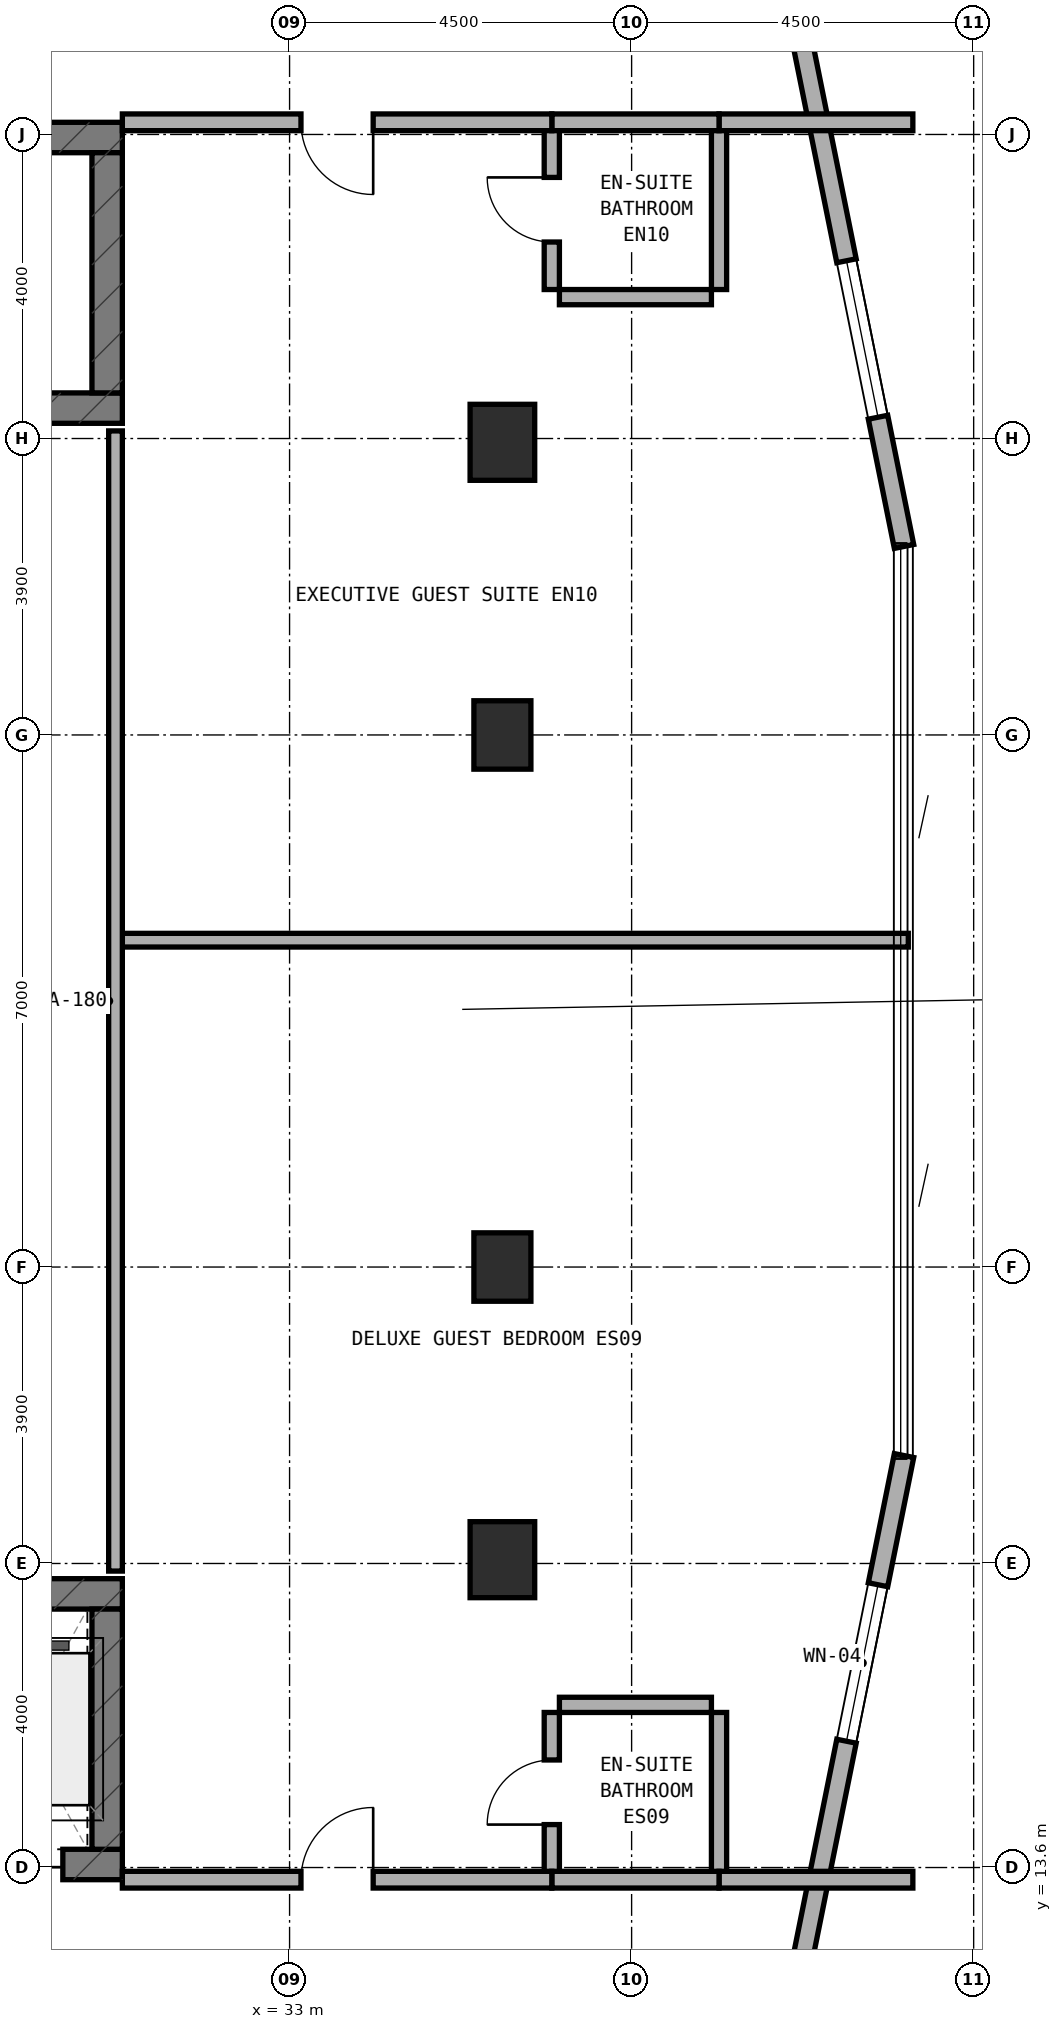
"""IFC4 building model, lengths in metres.
Left out: names, types, materials, properties, quantities, classifications, styles, units other than length and angle.
Written with IfcOpenShell. Run it as: python <this file> out.ifc"""

import sys

from ifc_helpers import new_model, si_unit, direction, frame, frame_2d, origin, origin_2d, place, context, subcontext, project, spatial, rectangle, extrude, element, fill, save


model = new_model("IFC4")
c1 = context("Model", 3, precision=1e-05, world=origin(), true_north=direction((0.0, 1.0)))
c2 = subcontext(c1, "Body", "Model", "MODEL_VIEW")
j1 = project(units=[si_unit("LENGTHUNIT", "METRE"), si_unit("PLANEANGLEUNIT", "RADIAN")], contexts=[c1])
p1 = place(None, origin())
s1 = spatial("IfcSite", under=j1, at=p1, CompositionType="ELEMENT")
p2 = place(p1, origin())
s2 = spatial("IfcBuilding", under=s1, at=p2, CompositionType="ELEMENT")
p3 = place(p2, frame((0.0, 0.0, 138.0)))
s3 = spatial("IfcBuildingStorey", under=s2, at=p3, CompositionType="ELEMENT", Elevation=138.0)
p4 = place(p3, frame((6.4, 32.8, 0.0), z_axis=(0.0, 0.0, 1.0), x_axis=(1.0, 0.0, 0.0)))
e1 = element("IfcWall", 1, at=p4, inside=s3, PredefinedType="SHEAR", context=c2, shape_type="SweptSolid", body=[
    extrude(rectangle(XDim=24.4, YDim=0.4, at=frame_2d((12.2, 0.0))), origin(), (0.0, 0.0, 1.0), 3.5),
])
p5 = place(p4, frame((6.05, 0.0, 0.0)))
e2 = element("IfcOpeningElement", 2, at=p5, cuts=e1, PredefinedType="OPENING", context=c2, shape_type="SweptSolid", body=[
    extrude(rectangle(XDim=1.1, YDim=2.15, at=frame_2d((0.55, 1.075))), frame((0.0, 0.21, 0.0), z_axis=(0.0, -1.0, 0.0), x_axis=(1.0, 0.0, 0.0)), (0.0, 0.0, 1.0), 0.42),
])
p6 = place(p3, frame((6.4, 36.36, 0.0), z_axis=(0.0, 0.0, 1.0), x_axis=(1.0, 0.0, 0.0)))
e3 = element("IfcWall", 3, at=p6, inside=s3, PredefinedType="SHEAR", context=c2, shape_type="SweptSolid", body=[
    extrude(rectangle(XDim=24.4, YDim=0.4, at=frame_2d((12.2, 0.0))), origin(), (0.0, 0.0, 1.0), 3.5),
])
p7 = place(p6, frame((9.15, 0.0, 0.0)))
e4 = element("IfcOpeningElement", 4, at=p7, cuts=e3, PredefinedType="OPENING", context=c2, shape_type="SweptSolid", body=[
    extrude(rectangle(XDim=1.2, YDim=2.15, at=frame_2d((0.6, 1.075))), frame((0.0, 0.21, 0.0), z_axis=(0.0, -1.0, 0.0), x_axis=(1.0, 0.0, 0.0)), (0.0, 0.0, 1.0), 0.42),
])
p8 = place(p6, frame((19.2, 0.0, 0.0)))
e5 = element("IfcOpeningElement", 5, at=p8, cuts=e3, PredefinedType="OPENING", context=c2, shape_type="SweptSolid", body=[
    extrude(rectangle(XDim=0.85, YDim=2.1, at=frame_2d((0.425, 1.05))), frame((0.0, 0.21, 0.0), z_axis=(0.0, -1.0, 0.0), x_axis=(1.0, 0.0, 0.0)), (0.0, 0.0, 1.0), 0.42),
])
p9 = place(p6, frame((16.94, 0.0, 0.0)))
e6 = element("IfcOpeningElement", 6, at=p9, cuts=e3, PredefinedType="OPENING", context=c2, shape_type="SweptSolid", body=[
    extrude(rectangle(XDim=0.85, YDim=2.1, at=frame_2d((0.425, 1.05))), frame((0.0, 0.21, 0.0), z_axis=(0.0, -1.0, 0.0), x_axis=(1.0, 0.0, 0.0)), (0.0, 0.0, 1.0), 0.42),
])
p10 = place(p3, frame((30.6, 33.0, 0.0), z_axis=(0.0, 0.0, 1.0), x_axis=(0.0, 1.0, 0.0)))
e7 = element("IfcWall", 7, at=p10, inside=s3, PredefinedType="SHEAR", context=c2, shape_type="SweptSolid", body=[
    extrude(rectangle(XDim=3.16, YDim=0.4, at=frame_2d((1.58, 0.0))), origin(), (0.0, 0.0, 1.0), 3.5),
])
p11 = place(p3, frame((6.4, 13.64, 0.0), z_axis=(0.0, 0.0, 1.0), x_axis=(1.0, 0.0, 0.0)))
e8 = element("IfcWall", 8, at=p11, inside=s3, PredefinedType="SHEAR", context=c2, shape_type="SweptSolid", body=[
    extrude(rectangle(XDim=24.4, YDim=0.4, at=frame_2d((12.2, 0.0))), origin(), (0.0, 0.0, 1.0), 3.5),
])
p12 = place(p11, frame((9.15, 0.0, 0.0)))
e9 = element("IfcOpeningElement", 9, at=p12, cuts=e8, PredefinedType="OPENING", context=c2, shape_type="SweptSolid", body=[
    extrude(rectangle(XDim=1.2, YDim=2.15, at=frame_2d((0.6, 1.075))), frame((0.0, 0.21, 0.0), z_axis=(0.0, -1.0, 0.0), x_axis=(1.0, 0.0, 0.0)), (0.0, 0.0, 1.0), 0.42),
])
p13 = place(p11, frame((16.94, 0.0, 0.0)))
e10 = element("IfcOpeningElement", 10, at=p13, cuts=e8, PredefinedType="OPENING", context=c2, shape_type="SweptSolid", body=[
    extrude(rectangle(XDim=0.85, YDim=2.1, at=frame_2d((0.425, 1.05))), frame((0.0, 0.21, 0.0), z_axis=(0.0, -1.0, 0.0), x_axis=(1.0, 0.0, 0.0)), (0.0, 0.0, 1.0), 0.42),
])
p14 = place(p11, frame((18.783, 0.0, 0.0)))
e11 = element("IfcOpeningElement", 11, at=p14, cuts=e8, PredefinedType="OPENING", context=c2, shape_type="SweptSolid", body=[
    extrude(rectangle(XDim=1.1, YDim=2.15, at=frame_2d((0.55, 1.075))), frame((0.0, 0.21, 0.0), z_axis=(0.0, -1.0, 0.0), x_axis=(1.0, 0.0, 0.0)), (0.0, 0.0, 1.0), 0.42),
])
p15 = place(p11, frame((20.65, 0.0, 0.0)))
e12 = element("IfcOpeningElement", 12, at=p15, cuts=e8, PredefinedType="OPENING", context=c2, shape_type="SweptSolid", body=[
    extrude(rectangle(XDim=1.1, YDim=2.15, at=frame_2d((0.55, 1.075))), frame((0.0, 0.21, 0.0), z_axis=(0.0, -1.0, 0.0), x_axis=(1.0, 0.0, 0.0)), (0.0, 0.0, 1.0), 0.42),
])
p16 = place(p11, frame((22.517, 0.0, 0.0)))
e13 = element("IfcOpeningElement", 13, at=p16, cuts=e8, PredefinedType="OPENING", context=c2, shape_type="SweptSolid", body=[
    extrude(rectangle(XDim=1.1, YDim=2.15, at=frame_2d((0.55, 1.075))), frame((0.0, 0.21, 0.0), z_axis=(0.0, -1.0, 0.0), x_axis=(1.0, 0.0, 0.0)), (0.0, 0.0, 1.0), 0.42),
])
p17 = place(p3, frame((6.4, 17.2, 0.0), z_axis=(0.0, 0.0, 1.0), x_axis=(1.0, 0.0, 0.0)))
e14 = element("IfcWall", 14, at=p17, inside=s3, PredefinedType="SHEAR", context=c2, shape_type="SweptSolid", body=[
    extrude(rectangle(XDim=24.4, YDim=0.4, at=frame_2d((12.2, 0.0))), origin(), (0.0, 0.0, 1.0), 3.5),
])
p18 = place(p3, frame((30.6, 13.84, 0.0), z_axis=(0.0, 0.0, 1.0), x_axis=(0.0, 1.0, 0.0)))
e15 = element("IfcWall", 15, at=p18, inside=s3, PredefinedType="SHEAR", context=c2, shape_type="SweptSolid", body=[
    extrude(rectangle(XDim=3.16, YDim=0.4, at=frame_2d((1.58, 0.0))), origin(), (0.0, 0.0, 1.0), 3.5),
])
for number, where, z_axis, x_axis in (
    (16, (35.8, 21.5, 0.0), (0.0, 0.0, 1.0), (1.0, 0.0, 0.0)),
    (17, (35.8, 28.5, 0.0), (0.0, 0.0, 1.0), (1.0, 0.0, 0.0)),
):
    element("IfcColumn", number, at=place(p3, frame(where, z_axis=z_axis, x_axis=x_axis)), inside=s3, PredefinedType="COLUMN", context=c2, shape_type="SweptSolid", body=[
        extrude(rectangle(XDim=0.75, YDim=0.9, at=origin_2d()), origin(), (0.0, 0.0, 1.0), 3.5),
    ])
for number, where, z_axis, x_axis in (
    (18, (35.8, 17.65, 0.0), (0.0, 0.0, 1.0), (1.0, 0.0, 0.0)),
    (19, (35.8, 32.35, 0.0), (0.0, 0.0, 1.0), (1.0, 0.0, 0.0)),
):
    element("IfcColumn", number, at=place(p3, frame(where, z_axis=z_axis, x_axis=x_axis)), inside=s3, PredefinedType="COLUMN", context=c2, shape_type="SweptSolid", body=[
        extrude(rectangle(XDim=0.85, YDim=1.0, at=origin_2d()), origin(), (0.0, 0.0, 1.0), 3.5),
    ])
p19 = place(p3, frame((39.271, 10.018, 0.0), z_axis=(0.0, 0.0, 1.0), x_axis=(0.197435082048, 0.980315963543, 0.0)))
e20 = element("IfcWall", 20, at=p19, inside=s3, PredefinedType="STANDARD", context=c2, shape_type="SweptSolid", body=[
    extrude(rectangle(XDim=9.183, YDim=0.26, at=frame_2d((4.591, 0.0))), origin(), (0.0, 0.0, 1.0), 3.22),
])
p20 = place(p19, frame((5.349, 0.0, 0.85)))
e21 = element("IfcOpeningElement", 21, at=p20, cuts=e20, PredefinedType="OPENING", context=c2, shape_type="SweptSolid", body=[
    extrude(rectangle(XDim=2.1, YDim=1.5, at=frame_2d((1.05, 0.75))), frame((0.0, 0.14, 0.0), z_axis=(0.0, -1.0, 0.0), x_axis=(1.0, 0.0, 0.0)), (0.0, 0.0, 1.0), 0.28),
])
p21 = place(p3, frame((41.084, 30.98, 0.0), z_axis=(0.0, 0.0, 1.0), x_axis=(-0.197435082048, 0.980315963543, 0.0)))
e22 = element("IfcWall", 22, at=p21, inside=s3, PredefinedType="STANDARD", context=c2, shape_type="SweptSolid", body=[
    extrude(rectangle(XDim=9.183, YDim=0.26, at=frame_2d((4.591, 0.0))), origin(), (0.0, 0.0, 1.0), 3.22),
])
p22 = place(p21, frame((1.734, 0.0, 0.85)))
e23 = element("IfcOpeningElement", 23, at=p22, cuts=e22, PredefinedType="OPENING", context=c2, shape_type="SweptSolid", body=[
    extrude(rectangle(XDim=2.1, YDim=1.5, at=frame_2d((1.05, 0.75))), frame((0.0, 0.14, 0.0), z_axis=(0.0, -1.0, 0.0), x_axis=(1.0, 0.0, 0.0)), (0.0, 0.0, 1.0), 0.28),
])
p23 = place(p3, frame((30.8, 25.8, 0.0), z_axis=(0.0, 0.0, 1.0), x_axis=(1.0, 0.0, 0.0)))
e24 = element("IfcWall", 24, at=p23, inside=s3, PredefinedType="SOLIDWALL", context=c2, shape_type="SweptSolid", body=[
    extrude(rectangle(XDim=10.34, YDim=0.18, at=frame_2d((5.17, 0.0))), origin(), (0.0, 0.0, 1.0), 2.835),
])
p24 = place(p3, frame((30.71, 17.5, 0.0), z_axis=(0.0, 0.0, 1.0), x_axis=(0.0, 1.0, 0.0)))
e25 = element("IfcWall", 25, at=p24, inside=s3, PredefinedType="SOLIDWALL", context=c2, shape_type="SweptSolid", body=[
    extrude(rectangle(XDim=15.0, YDim=0.18, at=frame_2d((7.5, 0.0))), origin(), (0.0, 0.0, 1.0), 2.695),
])
p25 = place(p3, frame((36.45, 13.54, 0.0), z_axis=(0.0, 0.0, 1.0), x_axis=(0.0, 1.0, 0.0)))
e26 = element("IfcWall", 26, at=p25, inside=s3, PredefinedType="PLUMBINGWALL", context=c2, shape_type="SweptSolid", body=[
    extrude(rectangle(XDim=2.1, YDim=0.2, at=frame_2d((1.05, 0.0))), origin(), (0.0, 0.0, 1.0), 3.22),
])
p26 = place(p25, frame((0.625, 0.0, 0.0)))
e27 = element("IfcOpeningElement", 27, at=p26, cuts=e26, PredefinedType="OPENING", context=c2, shape_type="SweptSolid", body=[
    extrude(rectangle(XDim=0.85, YDim=2.1, at=frame_2d((0.425, 1.05))), frame((0.0, 0.11, 0.0), z_axis=(0.0, -1.0, 0.0), x_axis=(1.0, 0.0, 0.0)), (0.0, 0.0, 1.0), 0.22),
])
p27 = place(p3, frame((36.55, 15.74, 0.0), z_axis=(0.0, 0.0, 1.0), x_axis=(1.0, 0.0, 0.0)))
e28 = element("IfcWall", 28, at=p27, inside=s3, PredefinedType="PLUMBINGWALL", context=c2, shape_type="SweptSolid", body=[
    extrude(rectangle(XDim=2.0, YDim=0.2, at=frame_2d((1.0, 0.0))), origin(), (0.0, 0.0, 1.0), 3.22),
])
p28 = place(p3, frame((38.65, 13.54, 0.0), z_axis=(0.0, 0.0, 1.0), x_axis=(0.0, 1.0, 0.0)))
e29 = element("IfcWall", 29, at=p28, inside=s3, PredefinedType="PLUMBINGWALL", context=c2, shape_type="SweptSolid", body=[
    extrude(rectangle(XDim=2.1, YDim=0.2, at=frame_2d((1.05, 0.0))), origin(), (0.0, 0.0, 1.0), 3.22),
])
p29 = place(p3, frame((38.65, 13.44, 0.0), z_axis=(0.0, 0.0, 1.0), x_axis=(1.0, 0.0, 0.0)))
e30 = element("IfcWall", 30, at=p29, inside=s3, PredefinedType="SOLIDWALL", context=c2, shape_type="SweptSolid", body=[
    extrude(rectangle(XDim=2.55, YDim=0.22, at=frame_2d((1.275, 0.0))), origin(), (0.0, 0.0, 1.0), 3.22),
])
p30 = place(p3, frame((36.45, 13.44, 0.0), z_axis=(0.0, 0.0, 1.0), x_axis=(1.0, 0.0, 0.0)))
e31 = element("IfcWall", 31, at=p30, inside=s3, PredefinedType="SOLIDWALL", context=c2, shape_type="SweptSolid", body=[
    extrude(rectangle(XDim=2.2, YDim=0.22, at=frame_2d((1.1, 0.0))), origin(), (0.0, 0.0, 1.0), 3.22),
])
p31 = place(p3, frame((30.8, 13.44, 0.0), z_axis=(0.0, 0.0, 1.0), x_axis=(1.0, 0.0, 0.0)))
e32 = element("IfcWall", 32, at=p31, inside=s3, PredefinedType="SOLIDWALL", context=c2, shape_type="SweptSolid", body=[
    extrude(rectangle(XDim=5.65, YDim=0.22, at=frame_2d((2.825, 0.0))), origin(), (0.0, 0.0, 1.0), 2.695),
])
p32 = place(p31, frame((2.35, 0.0, 0.0)))
e33 = element("IfcOpeningElement", 33, at=p32, cuts=e32, PredefinedType="OPENING", context=c2, shape_type="SweptSolid", body=[
    extrude(rectangle(XDim=0.95, YDim=2.1, at=frame_2d((0.475, 1.05))), frame((0.0, 0.12, 0.0), z_axis=(0.0, -1.0, 0.0), x_axis=(1.0, 0.0, 0.0)), (0.0, 0.0, 1.0), 0.24),
])
p33 = place(p3, frame((36.45, 34.36, 0.0), z_axis=(0.0, 0.0, 1.0), x_axis=(0.0, 1.0, 0.0)))
e34 = element("IfcWall", 34, at=p33, inside=s3, PredefinedType="PLUMBINGWALL", context=c2, shape_type="SweptSolid", body=[
    extrude(rectangle(XDim=2.1, YDim=0.2, at=frame_2d((1.05, 0.0))), origin(), (0.0, 0.0, 1.0), 3.22),
])
p34 = place(p33, frame((0.625, 0.0, 0.0)))
e35 = element("IfcOpeningElement", 35, at=p34, cuts=e34, PredefinedType="OPENING", context=c2, shape_type="SweptSolid", body=[
    extrude(rectangle(XDim=0.85, YDim=2.1, at=frame_2d((0.425, 1.05))), frame((0.0, 0.11, 0.0), z_axis=(0.0, -1.0, 0.0), x_axis=(1.0, 0.0, 0.0)), (0.0, 0.0, 1.0), 0.22),
])
p35 = place(p3, frame((36.55, 34.26, 0.0), z_axis=(0.0, 0.0, 1.0), x_axis=(1.0, 0.0, 0.0)))
e36 = element("IfcWall", 36, at=p35, inside=s3, PredefinedType="PLUMBINGWALL", context=c2, shape_type="SweptSolid", body=[
    extrude(rectangle(XDim=2.0, YDim=0.2, at=frame_2d((1.0, 0.0))), origin(), (0.0, 0.0, 1.0), 3.22),
])
p36 = place(p3, frame((38.65, 34.36, 0.0), z_axis=(0.0, 0.0, 1.0), x_axis=(0.0, 1.0, 0.0)))
e37 = element("IfcWall", 37, at=p36, inside=s3, PredefinedType="PLUMBINGWALL", context=c2, shape_type="SweptSolid", body=[
    extrude(rectangle(XDim=2.1, YDim=0.2, at=frame_2d((1.05, 0.0))), origin(), (0.0, 0.0, 1.0), 3.22),
])
p37 = place(p3, frame((38.65, 36.56, 0.0), z_axis=(0.0, 0.0, 1.0), x_axis=(1.0, 0.0, 0.0)))
e38 = element("IfcWall", 38, at=p37, inside=s3, PredefinedType="SOLIDWALL", context=c2, shape_type="SweptSolid", body=[
    extrude(rectangle(XDim=2.55, YDim=0.22, at=frame_2d((1.275, 0.0))), origin(), (0.0, 0.0, 1.0), 3.22),
])
p38 = place(p3, frame((36.45, 36.56, 0.0), z_axis=(0.0, 0.0, 1.0), x_axis=(1.0, 0.0, 0.0)))
e39 = element("IfcWall", 39, at=p38, inside=s3, PredefinedType="SOLIDWALL", context=c2, shape_type="SweptSolid", body=[
    extrude(rectangle(XDim=2.2, YDim=0.22, at=frame_2d((1.1, 0.0))), origin(), (0.0, 0.0, 1.0), 3.22),
])
p39 = place(p3, frame((30.8, 36.56, 0.0), z_axis=(0.0, 0.0, 1.0), x_axis=(1.0, 0.0, 0.0)))
e40 = element("IfcWall", 40, at=p39, inside=s3, PredefinedType="SOLIDWALL", context=c2, shape_type="SweptSolid", body=[
    extrude(rectangle(XDim=5.65, YDim=0.22, at=frame_2d((2.825, 0.0))), origin(), (0.0, 0.0, 1.0), 2.695),
])
p40 = place(p39, frame((2.35, 0.0, 0.0)))
e41 = element("IfcOpeningElement", 41, at=p40, cuts=e40, PredefinedType="OPENING", context=c2, shape_type="SweptSolid", body=[
    extrude(rectangle(XDim=0.95, YDim=2.1, at=frame_2d((0.475, 1.05))), frame((0.0, 0.12, 0.0), z_axis=(0.0, -1.0, 0.0), x_axis=(1.0, 0.0, 0.0)), (0.0, 0.0, 1.0), 0.24),
])
p41 = place(p20, origin())
e42 = element("IfcWindow", 42, at=p41, inside=s3, PartitioningType="SINGLE_PANEL", PredefinedType="WINDOW", context=c2, shape_type="SweptSolid", body=[
    extrude(rectangle(XDim=2.1, YDim=1.5, at=frame_2d((1.05, 0.75))), frame((0.0, 0.03, 0.0), z_axis=(0.0, -1.0, 0.0), x_axis=(1.0, 0.0, 0.0)), (0.0, 0.0, 1.0), 0.06),
])
fill(e21, e42)
p42 = place(p22, origin())
e43 = element("IfcWindow", 43, at=p42, inside=s3, PartitioningType="SINGLE_PANEL", PredefinedType="WINDOW", context=c2, shape_type="SweptSolid", body=[
    extrude(rectangle(XDim=2.1, YDim=1.5, at=frame_2d((1.05, 0.75))), frame((0.0, 0.03, 0.0), z_axis=(0.0, -1.0, 0.0), x_axis=(1.0, 0.0, 0.0)), (0.0, 0.0, 1.0), 0.06),
])
fill(e23, e43)
p43 = place(p16, frame((1.1, 0.0, 0.0), z_axis=(0.0, 0.0, 1.0), x_axis=(-1.0, 0.0, 0.0)))
e44 = element("IfcDoor", 44, at=p43, inside=s3, OperationType="DOUBLE_DOOR_SLIDING", PredefinedType="DOOR", context=c2, shape_type="SweptSolid", body=[
    extrude(rectangle(XDim=1.1, YDim=2.15, at=frame_2d((0.55, 1.075))), frame((0.0, 0.025, 0.0), z_axis=(0.0, -1.0, 0.0), x_axis=(1.0, 0.0, 0.0)), (0.0, 0.0, 1.0), 0.05),
])
fill(e13, e44)
p44 = place(p26, origin())
e45 = element("IfcDoor", 45, at=p44, inside=s3, OperationType="SINGLE_SWING_LEFT", PredefinedType="DOOR", context=c2, shape_type="SweptSolid", body=[
    extrude(rectangle(XDim=0.85, YDim=2.1, at=frame_2d((0.425, 1.05))), frame((0.0, 0.025, 0.0), z_axis=(0.0, -1.0, 0.0), x_axis=(1.0, 0.0, 0.0)), (0.0, 0.0, 1.0), 0.05),
])
fill(e27, e45)
p45 = place(p32, origin())
e46 = element("IfcDoor", 46, at=p45, inside=s3, OperationType="SINGLE_SWING_RIGHT", PredefinedType="DOOR", context=c2, shape_type="SweptSolid", body=[
    extrude(rectangle(XDim=0.95, YDim=2.1, at=frame_2d((0.475, 1.05))), frame((0.0, 0.025, 0.0), z_axis=(0.0, -1.0, 0.0), x_axis=(1.0, 0.0, 0.0)), (0.0, 0.0, 1.0), 0.05),
])
fill(e33, e46)
p46 = place(p34, origin())
e47 = element("IfcDoor", 47, at=p46, inside=s3, OperationType="SINGLE_SWING_RIGHT", PredefinedType="DOOR", context=c2, shape_type="SweptSolid", body=[
    extrude(rectangle(XDim=0.85, YDim=2.1, at=frame_2d((0.425, 1.05))), frame((0.0, 0.025, 0.0), z_axis=(0.0, -1.0, 0.0), x_axis=(1.0, 0.0, 0.0)), (0.0, 0.0, 1.0), 0.05),
])
fill(e35, e47)
p47 = place(p40, frame((0.95, 0.0, 0.0), z_axis=(0.0, 0.0, 1.0), x_axis=(-1.0, 0.0, 0.0)))
e48 = element("IfcDoor", 48, at=p47, inside=s3, OperationType="SINGLE_SWING_LEFT", PredefinedType="DOOR", context=c2, shape_type="SweptSolid", body=[
    extrude(rectangle(XDim=0.95, YDim=2.1, at=frame_2d((0.475, 1.05))), frame((0.0, 0.025, 0.0), z_axis=(0.0, -1.0, 0.0), x_axis=(1.0, 0.0, 0.0)), (0.0, 0.0, 1.0), 0.05),
])
fill(e41, e48)
save(model, sys.argv[1])
